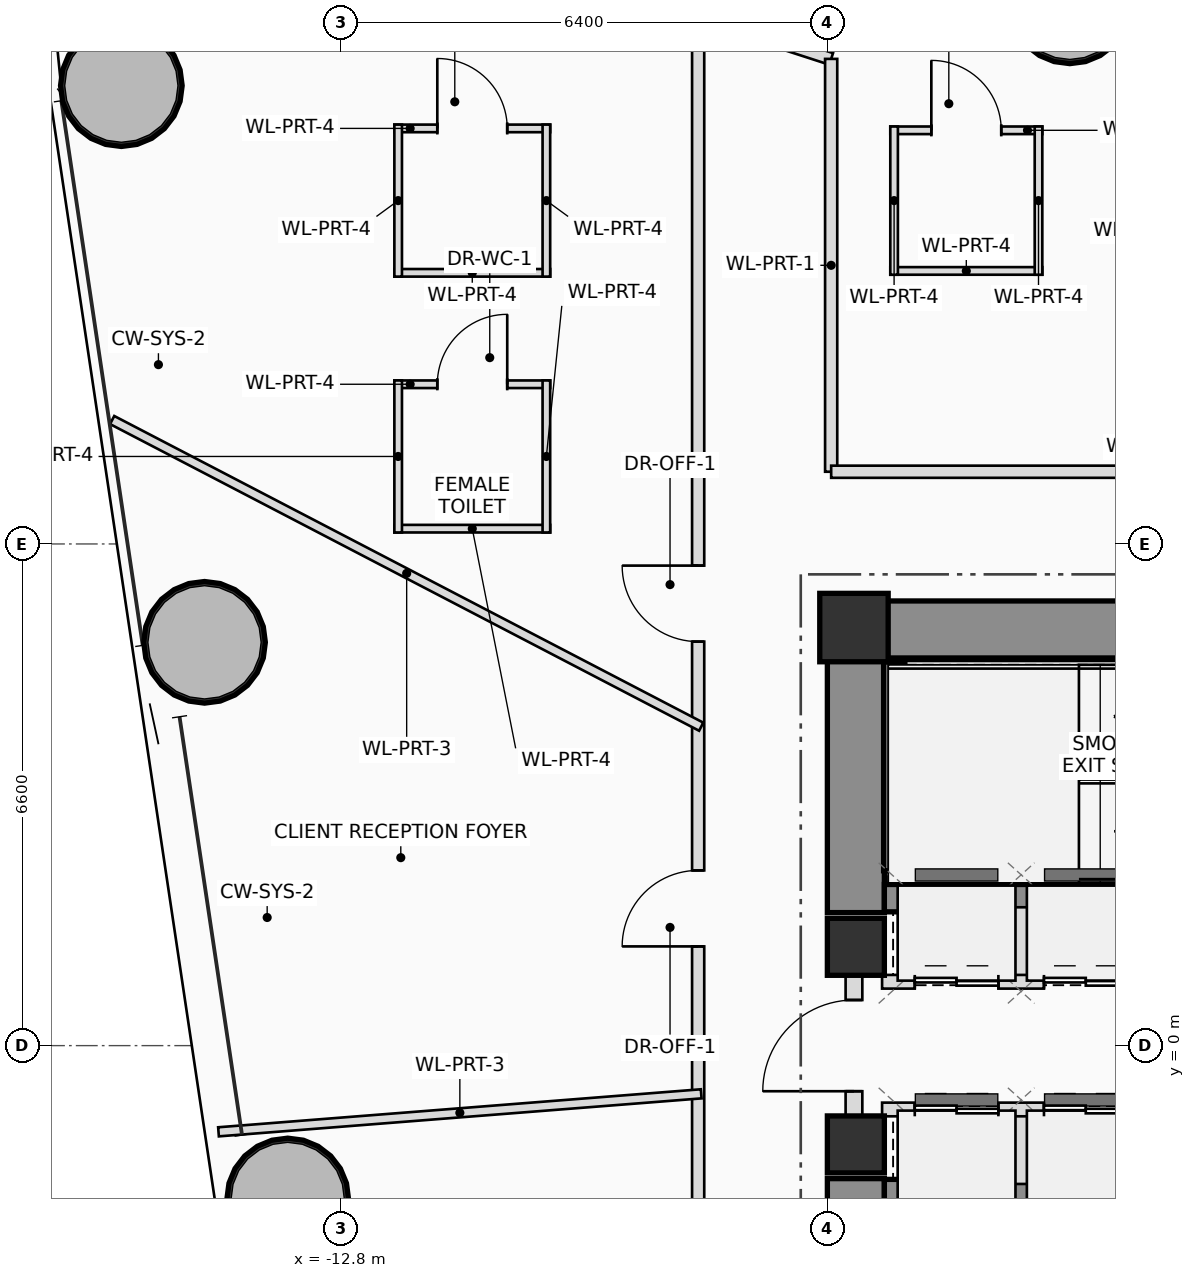
"""IFC4 building model, lengths in metres.
Left out: names, types, materials, properties, quantities, classifications, styles, units other than length and angle.
Written with IfcOpenShell. Run it as: python <this file> out.ifc"""

import sys

from ifc_helpers import new_model, si_unit, direction, frame, frame_2d, origin, origin_2d, place, context, subcontext, project, spatial, rectangle, hollow_circle, extrude, source, transform, mapped, element, fill, save


model = new_model("IFC4")
c1 = context("Model", 3, precision=1e-05, world=origin(), true_north=direction((0.0, 1.0)))
c2 = subcontext(c1, "Body", "Model", "MODEL_VIEW")
j1 = project(units=[si_unit("LENGTHUNIT", "METRE"), si_unit("PLANEANGLEUNIT", "RADIAN")], contexts=[c1])
p1 = place(None, origin())
s1 = spatial("IfcSite", under=j1, at=p1, CompositionType="ELEMENT")
p2 = place(p1, origin())
s2 = spatial("IfcBuilding", under=s1, at=p2, CompositionType="ELEMENT")
p3 = place(p2, frame((0.0, 0.0, 69.8)))
s3 = spatial("IfcBuildingStorey", under=s2, at=p3, CompositionType="ELEMENT", Elevation=69.8)
m1 = source(origin(), c2, "Body", "SweptSolid", [
    extrude(rectangle(XDim=0.9, YDim=0.9, at=origin_2d()), origin(), (0.0, 0.0, 1.0), 3.75),
])
p4 = place(p3, frame((-6.05, 5.5, 0.0), z_axis=(0.0, 0.0, 1.0), x_axis=(1.0, 0.0, 0.0)))
e1 = element("IfcColumn", 1, at=p4, inside=s3, PredefinedType="COLUMN", context=c2, shape_type="MappedRepresentation", body=[
    mapped(m1, transform((0.0, 0.0, 0.0), scale=1.0)),
])
p5 = place(p3, frame((-6.4, 5.475, 0.0), z_axis=(0.0, 0.0, 1.0), x_axis=(1.0, 0.0, 0.0)))
e2 = element("IfcWall", 2, at=p5, inside=s3, PredefinedType="SHEAR", context=c2, shape_type="SweptSolid", body=[
    extrude(rectangle(XDim=12.8, YDim=0.75, at=frame_2d((6.4, 0.0))), origin(), (0.0, 0.0, 1.0), 3.75),
])
p6 = place(p5, frame((8.6, 0.0, 0.0)))
e3 = element("IfcOpeningElement", 3, at=p6, cuts=e2, PredefinedType="OPENING", context=c2, shape_type="SweptSolid", body=[
    extrude(rectangle(XDim=1.2, YDim=2.2, at=frame_2d((0.6, 1.1))), frame((0.0, 0.385, 0.0), z_axis=(0.0, -1.0, 0.0), x_axis=(1.0, 0.0, 0.0)), (0.0, 0.0, 1.0), 0.77),
])
for number, where, z_axis, x_axis in (
    (4, (-6.025, -5.1, 0.0), (0.0, 0.0, 1.0), (0.0, 1.0, 0.0)),
    (5, (-6.025, 1.75, 0.0), (0.0, 0.0, 1.0), (0.0, 1.0, 0.0)),
):
    element("IfcWall", number, at=place(p3, frame(where, z_axis=z_axis, x_axis=x_axis)), inside=s3, PredefinedType="SHEAR", context=c2, shape_type="SweptSolid", body=[
        extrude(rectangle(XDim=3.35, YDim=0.75, at=frame_2d((1.675, 0.0))), origin(), (0.0, 0.0, 1.0), 3.75),
    ])
for number, where, z_axis, x_axis in (
    (6, (-5.65, 1.94, 0.0), (0.0, 0.0, 1.0), (1.0, 0.0, 0.0)),
    (7, (-5.65, -1.94, 0.0), (0.0, 0.0, 1.0), (1.0, 0.0, 0.0)),
):
    element("IfcWall", number, at=place(p3, frame(where, z_axis=z_axis, x_axis=x_axis)), inside=s3, PredefinedType="SHEAR", context=c2, shape_type="SweptSolid", body=[
        extrude(rectangle(XDim=11.3, YDim=0.36, at=frame_2d((5.65, 0.0))), origin(), (0.0, 0.0, 1.0), 3.75),
    ])
p7 = place(p3, frame((-5.52, 2.3, 0.0), z_axis=(0.0, 0.0, 1.0), x_axis=(0.0, 1.0, 0.0)))
e8 = element("IfcWall", 8, at=p7, inside=s3, PredefinedType="SHEAR", context=c2, shape_type="SweptSolid", body=[
    extrude(rectangle(XDim=2.75, YDim=0.28, at=frame_2d((1.375, 0.0))), origin(), (0.0, 0.0, 1.0), 3.75),
])
m2 = source(origin(), c2, "Body", "SweptSolid", [
    extrude(rectangle(XDim=0.75, YDim=0.75, at=origin_2d()), origin(), (0.0, 0.0, 1.0), 3.75),
])
for number, where, z_axis, x_axis in (
    (9, (-6.025, -1.3, 0.0), (0.0, 0.0, 1.0), (1.0, 0.0, 0.0)),
    (10, (-6.025, 1.3, 0.0), (0.0, 0.0, 1.0), (1.0, 0.0, 0.0)),
):
    element("IfcColumn", number, at=place(p3, frame(where, z_axis=z_axis, x_axis=x_axis)), inside=s3, PredefinedType="COLUMN", context=c2, shape_type="MappedRepresentation", body=[
        mapped(m2, transform((0.0, 0.0, 0.0), scale=1.0)),
    ])
m3 = source(origin(), c2, "Body", "SweptSolid", [
    extrude(hollow_circle(Radius=0.8, WallThickness=0.055, at=origin_2d()), origin(), (0.0, 0.0, 1.0), 3.75),
])
for number, where, z_axis, x_axis in (
    (11, (-3.21, 13.719, 0.0), (0.0, 0.0, 1.0), (1.0, 0.0, 0.0)),
    (12, (-15.689, 12.629, 0.0), (0.0, 0.0, 1.0), (1.0, 0.0, 0.0)),
    (13, (-14.594, 5.306, 0.0), (0.0, 0.0, 1.0), (1.0, 0.0, 0.0)),
    (14, (-13.5, -2.018, 0.0), (0.0, 0.0, 1.0), (1.0, 0.0, 0.0)),
):
    element("IfcColumn", number, at=place(p3, frame(where, z_axis=z_axis, x_axis=x_axis)), inside=s3, PredefinedType="COLUMN", context=c2, shape_type="MappedRepresentation", body=[
        mapped(m3, transform((0.0, 0.0, 0.0), scale=1.0)),
    ])
p8 = place(p3, frame((-6.05, -0.95, 0.0), z_axis=(0.0, 0.0, 1.0), x_axis=(0.0, 1.0, 0.0)))
e15 = element("IfcWall", 15, at=p8, inside=s3, PredefinedType="PLUMBINGWALL", context=c2, shape_type="SweptSolid", body=[
    extrude(rectangle(XDim=1.9, YDim=0.22, at=frame_2d((0.95, 0.0))), origin(), (0.0, 0.0, 1.0), 2.525),
])
p9 = place(p8, frame((0.35, 0.0, 0.0)))
e16 = element("IfcOpeningElement", 16, at=p9, cuts=e15, PredefinedType="OPENING", context=c2, shape_type="SweptSolid", body=[
    extrude(rectangle(XDim=1.2, YDim=2.2, at=frame_2d((0.6, 1.1))), frame((0.0, 0.12, 0.0), z_axis=(0.0, -1.0, 0.0), x_axis=(1.0, 0.0, 0.0)), (0.0, 0.0, 1.0), 0.24),
])
for number, where, z_axis, x_axis in (
    (17, (-3.85, 0.84, 0.0), (0.0, 0.0, 1.0), (0.0, 1.0, 0.0)),
    (18, (-3.85, -1.82, 0.0), (0.0, 0.0, 1.0), (0.0, 1.0, 0.0)),
):
    element("IfcWall", number, at=place(p3, frame(where, z_axis=z_axis, x_axis=x_axis)), inside=s3, PredefinedType="PLUMBINGWALL", context=c2, shape_type="SweptSolid", body=[
        extrude(rectangle(XDim=0.98, YDim=0.18, at=frame_2d((0.49, 0.0))), origin(), (0.0, 0.0, 1.0), 3.545),
    ])
p10 = place(p3, frame((-5.68, 0.84, 0.0), z_axis=(0.0, 0.0, 1.0), x_axis=(1.0, 0.0, 0.0)))
e19 = element("IfcWall", 19, at=p10, inside=s3, PredefinedType="PLUMBINGWALL", context=c2, shape_type="SweptSolid", body=[
    extrude(rectangle(XDim=11.33, YDim=0.18, at=frame_2d((5.665, 0.0))), origin(), (0.0, 0.0, 1.0), 3.545),
])
p11 = place(p10, frame((0.43, 0.0, 0.0)))
e20 = element("IfcOpeningElement", 20, at=p11, cuts=e19, PredefinedType="OPENING", context=c2, shape_type="SweptSolid", body=[
    extrude(rectangle(XDim=1.1, YDim=2.2, at=frame_2d((0.55, 1.1))), frame((0.0, 0.1, 0.0), z_axis=(0.0, -1.0, 0.0), x_axis=(1.0, 0.0, 0.0)), (0.0, 0.0, 1.0), 0.2),
])
p12 = place(p10, frame((2.13, 0.0, 0.0)))
e21 = element("IfcOpeningElement", 21, at=p12, cuts=e19, PredefinedType="OPENING", context=c2, shape_type="SweptSolid", body=[
    extrude(rectangle(XDim=1.1, YDim=2.2, at=frame_2d((0.55, 1.1))), frame((0.0, 0.1, 0.0), z_axis=(0.0, -1.0, 0.0), x_axis=(1.0, 0.0, 0.0)), (0.0, 0.0, 1.0), 0.2),
])
p13 = place(p3, frame((-5.68, -0.84, 0.0), z_axis=(0.0, 0.0, 1.0), x_axis=(1.0, 0.0, 0.0)))
e22 = element("IfcWall", 22, at=p13, inside=s3, PredefinedType="PLUMBINGWALL", context=c2, shape_type="SweptSolid", body=[
    extrude(rectangle(XDim=10.22, YDim=0.18, at=frame_2d((5.11, 0.0))), origin(), (0.0, 0.0, 1.0), 3.545),
])
p14 = place(p13, frame((0.43, 0.0, 0.0)))
e23 = element("IfcOpeningElement", 23, at=p14, cuts=e22, PredefinedType="OPENING", context=c2, shape_type="SweptSolid", body=[
    extrude(rectangle(XDim=1.1, YDim=2.2, at=frame_2d((0.55, 1.1))), frame((0.0, 0.1, 0.0), z_axis=(0.0, -1.0, 0.0), x_axis=(1.0, 0.0, 0.0)), (0.0, 0.0, 1.0), 0.2),
])
p15 = place(p13, frame((2.13, 0.0, 0.0)))
e24 = element("IfcOpeningElement", 24, at=p15, cuts=e22, PredefinedType="OPENING", context=c2, shape_type="SweptSolid", body=[
    extrude(rectangle(XDim=1.1, YDim=2.2, at=frame_2d((0.55, 1.1))), frame((0.0, 0.1, 0.0), z_axis=(0.0, -1.0, 0.0), x_axis=(1.0, 0.0, 0.0)), (0.0, 0.0, 1.0), 0.2),
])
p16 = place(p13, frame((9.02, 0.0, 0.0)))
e25 = element("IfcOpeningElement", 25, at=p16, cuts=e22, PredefinedType="OPENING", context=c2, shape_type="SweptSolid", body=[
    extrude(rectangle(XDim=0.9, YDim=2.05, at=frame_2d((0.45, 1.025))), frame((0.0, 0.1, 0.0), z_axis=(0.0, -1.0, 0.0), x_axis=(1.0, 0.0, 0.0)), (0.0, 0.0, 1.0), 0.2),
])
p17 = place(p3, frame((-12.097, 12.067, 0.0), z_axis=(0.0, 0.0, 1.0), x_axis=(1.0, 0.0, 0.0)))
e26 = element("IfcWall", 26, at=p17, inside=s3, PredefinedType="PARTITIONING", context=c2, shape_type="SweptSolid", body=[
    extrude(rectangle(XDim=2.05, YDim=0.1, at=frame_2d((1.025, 0.0))), origin(), (0.0, 0.0, 1.0), 3.2),
])
p18 = place(p17, frame((0.565, 0.0, 0.0)))
e27 = element("IfcOpeningElement", 27, at=p18, cuts=e26, PredefinedType="OPENING", context=c2, shape_type="SweptSolid", body=[
    extrude(rectangle(XDim=0.92, YDim=2.1, at=frame_2d((0.46, 1.05))), frame((0.0, 0.06, 0.0), z_axis=(0.0, -1.0, 0.0), x_axis=(1.0, 0.0, 0.0)), (0.0, 0.0, 1.0), 0.12),
])
p19 = place(p3, frame((-10.047, 10.167, 0.0), z_axis=(0.0, 0.0, 1.0), x_axis=(-1.0, 0.0, 0.0)))
e28 = element("IfcWall", 28, at=p19, inside=s3, PredefinedType="PARTITIONING", context=c2, shape_type="SweptSolid", body=[
    extrude(rectangle(XDim=2.05, YDim=0.1, at=frame_2d((1.025, 0.0))), origin(), (0.0, 0.0, 1.0), 3.545),
])
p20 = place(p3, frame((-10.097, 12.117, 0.0), z_axis=(0.0, 0.0, 1.0), x_axis=(0.0, -1.0, 0.0)))
e29 = element("IfcWall", 29, at=p20, inside=s3, PredefinedType="PARTITIONING", context=c2, shape_type="SweptSolid", body=[
    extrude(rectangle(XDim=2.0, YDim=0.1, at=frame_2d((1.0, 0.0))), origin(), (0.0, 0.0, 1.0), 3.545),
])
p21 = place(p3, frame((-12.047, 10.117, 0.0), z_axis=(0.0, 0.0, 1.0), x_axis=(0.0, 1.0, 0.0)))
e30 = element("IfcWall", 30, at=p21, inside=s3, PredefinedType="PARTITIONING", context=c2, shape_type="SweptSolid", body=[
    extrude(rectangle(XDim=2.0, YDim=0.1, at=frame_2d((1.0, 0.0))), origin(), (0.0, 0.0, 1.0), 3.2),
])
p22 = place(p3, frame((-12.097, 8.701, 0.0), z_axis=(0.0, 0.0, 1.0), x_axis=(1.0, 0.0, 0.0)))
e31 = element("IfcWall", 31, at=p22, inside=s3, PredefinedType="PARTITIONING", context=c2, shape_type="SweptSolid", body=[
    extrude(rectangle(XDim=2.05, YDim=0.1, at=frame_2d((1.025, 0.0))), origin(), (0.0, 0.0, 1.0), 2.85),
])
p23 = place(p22, frame((0.565, 0.0, 0.0)))
e32 = element("IfcOpeningElement", 32, at=p23, cuts=e31, PredefinedType="OPENING", context=c2, shape_type="SweptSolid", body=[
    extrude(rectangle(XDim=0.92, YDim=2.1, at=frame_2d((0.46, 1.05))), frame((0.0, 0.06, 0.0), z_axis=(0.0, -1.0, 0.0), x_axis=(1.0, 0.0, 0.0)), (0.0, 0.0, 1.0), 0.12),
])
p24 = place(p3, frame((-10.047, 6.801, 0.0), z_axis=(0.0, 0.0, 1.0), x_axis=(-1.0, 0.0, 0.0)))
e33 = element("IfcWall", 33, at=p24, inside=s3, PredefinedType="PARTITIONING", context=c2, shape_type="SweptSolid", body=[
    extrude(rectangle(XDim=2.05, YDim=0.1, at=frame_2d((1.025, 0.0))), origin(), (0.0, 0.0, 1.0), 3.05),
])
p25 = place(p3, frame((-10.097, 8.751, 0.0), z_axis=(0.0, 0.0, 1.0), x_axis=(0.0, -1.0, 0.0)))
e34 = element("IfcWall", 34, at=p25, inside=s3, PredefinedType="PARTITIONING", context=c2, shape_type="SweptSolid", body=[
    extrude(rectangle(XDim=2.0, YDim=0.1, at=frame_2d((1.0, 0.0))), origin(), (0.0, 0.0, 1.0), 2.85),
])
p26 = place(p3, frame((-12.047, 6.751, 0.0), z_axis=(0.0, 0.0, 1.0), x_axis=(0.0, 1.0, 0.0)))
e35 = element("IfcWall", 35, at=p26, inside=s3, PredefinedType="PARTITIONING", context=c2, shape_type="SweptSolid", body=[
    extrude(rectangle(XDim=2.0, YDim=0.1, at=frame_2d((1.0, 0.0))), origin(), (0.0, 0.0, 1.0), 3.545),
])
p27 = place(p3, frame((-5.572, 12.042, 0.0), z_axis=(0.0, 0.0, 1.0), x_axis=(1.0, 0.0, 0.0)))
e36 = element("IfcWall", 36, at=p27, inside=s3, PredefinedType="PARTITIONING", context=c2, shape_type="SweptSolid", body=[
    extrude(rectangle(XDim=2.0, YDim=0.1, at=frame_2d((1.0, 0.0))), origin(), (0.0, 0.0, 1.0), 2.85),
])
p28 = place(p27, frame((0.54, 0.0, 0.0)))
e37 = element("IfcOpeningElement", 37, at=p28, cuts=e36, PredefinedType="OPENING", context=c2, shape_type="SweptSolid", body=[
    extrude(rectangle(XDim=0.92, YDim=2.1, at=frame_2d((0.46, 1.05))), frame((0.0, 0.06, 0.0), z_axis=(0.0, -1.0, 0.0), x_axis=(1.0, 0.0, 0.0)), (0.0, 0.0, 1.0), 0.12),
])
p29 = place(p3, frame((-3.572, 10.192, 0.0), z_axis=(0.0, 0.0, 1.0), x_axis=(-1.0, 0.0, 0.0)))
e38 = element("IfcWall", 38, at=p29, inside=s3, PredefinedType="PARTITIONING", context=c2, shape_type="SweptSolid", body=[
    extrude(rectangle(XDim=2.0, YDim=0.1, at=frame_2d((1.0, 0.0))), origin(), (0.0, 0.0, 1.0), 2.85),
])
p30 = place(p3, frame((-3.622, 12.092, 0.0), z_axis=(0.0, 0.0, 1.0), x_axis=(0.0, -1.0, 0.0)))
e39 = element("IfcWall", 39, at=p30, inside=s3, PredefinedType="PARTITIONING", context=c2, shape_type="SweptSolid", body=[
    extrude(rectangle(XDim=1.95, YDim=0.1, at=frame_2d((0.975, 0.0))), origin(), (0.0, 0.0, 1.0), 2.85),
])
p31 = place(p3, frame((-5.522, 10.142, 0.0), z_axis=(0.0, 0.0, 1.0), x_axis=(0.0, 1.0, 0.0)))
e40 = element("IfcWall", 40, at=p31, inside=s3, PredefinedType="PARTITIONING", context=c2, shape_type="SweptSolid", body=[
    extrude(rectangle(XDim=1.95, YDim=0.1, at=frame_2d((0.975, 0.0))), origin(), (0.0, 0.0, 1.0), 3.2),
])
p32 = place(p3, frame((-8.1, -7.55, 0.0), z_axis=(0.0, 0.0, 1.0), x_axis=(0.0, 1.0, 0.0)))
e41 = element("IfcWall", 41, at=p32, inside=s3, PredefinedType="PARTITIONING", context=c2, shape_type="SweptSolid", body=[
    extrude(rectangle(XDim=15.1, YDim=0.16, at=frame_2d((7.55, 0.0))), origin(), (0.0, 0.0, 1.0), 2.85),
])
p33 = place(p32, frame((8.855, 0.0, 0.0)))
e42 = element("IfcOpeningElement", 42, at=p33, cuts=e41, PredefinedType="OPENING", context=c2, shape_type="SweptSolid", body=[
    extrude(rectangle(XDim=1.0, YDim=2.25, at=frame_2d((0.5, 1.125))), frame((0.0, 0.09, 0.0), z_axis=(0.0, -1.0, 0.0), x_axis=(1.0, 0.0, 0.0)), (0.0, 0.0, 1.0), 0.18),
])
p34 = place(p32, frame((12.865, 0.0, 0.0)))
e43 = element("IfcOpeningElement", 43, at=p34, cuts=e41, PredefinedType="OPENING", context=c2, shape_type="SweptSolid", body=[
    extrude(rectangle(XDim=1.0, YDim=2.25, at=frame_2d((0.5, 1.125))), frame((0.0, 0.09, 0.0), z_axis=(0.0, -1.0, 0.0), x_axis=(1.0, 0.0, 0.0)), (0.0, 0.0, 1.0), 0.18),
])
p35 = place(p3, frame((-8.1, 7.55, 0.0), z_axis=(0.0, 0.0, 1.0), x_axis=(0.0, 1.0, 0.0)))
e44 = element("IfcWall", 44, at=p35, inside=s3, PredefinedType="PARTITIONING", context=c2, shape_type="SweptSolid", body=[
    extrude(rectangle(XDim=5.85, YDim=0.16, at=frame_2d((2.925, 0.0))), origin(), (0.0, 0.0, 1.0), 2.85),
])
p36 = place(p3, frame((-7.641, 13.4, 0.0), z_axis=(0.0, 0.0, 1.0), x_axis=(0.951277022007, -0.308337521884, 0.0)))
e45 = element("IfcWall", 45, at=p36, inside=s3, PredefinedType="PARTITIONING", context=c2, shape_type="SweptSolid", body=[
    extrude(rectangle(XDim=1.357, YDim=0.16, at=frame_2d((0.679, 0.0))), origin(), (0.0, 0.0, 1.0), 3.545),
])
p37 = place(p3, frame((-6.35, 12.981, 0.0), z_axis=(0.0, 0.0, 1.0), x_axis=(0.0, -1.0, 0.0)))
e46 = element("IfcWall", 46, at=p37, inside=s3, PredefinedType="PARTITIONING", context=c2, shape_type="SweptSolid", body=[
    extrude(rectangle(XDim=5.431, YDim=0.16, at=frame_2d((2.716, 0.0))), origin(), (0.0, 0.0, 1.0), 3.05),
])
p38 = place(p3, frame((-6.35, 7.55, 0.0), z_axis=(0.0, 0.0, 1.0), x_axis=(1.0, 0.0, 0.0)))
e47 = element("IfcWall", 47, at=p38, inside=s3, PredefinedType="PARTITIONING", context=c2, shape_type="SweptSolid", body=[
    extrude(rectangle(XDim=12.7, YDim=0.16, at=frame_2d((6.35, 0.0))), origin(), (0.0, 0.0, 1.0), 2.85),
])
p39 = place(p38, frame((8.564, 0.0, 0.0)))
e48 = element("IfcOpeningElement", 48, at=p39, cuts=e47, PredefinedType="OPENING", context=c2, shape_type="SweptSolid", body=[
    extrude(rectangle(XDim=1.0, YDim=2.25, at=frame_2d((0.5, 1.125))), frame((0.0, 0.09, 0.0), z_axis=(0.0, -1.0, 0.0), x_axis=(1.0, 0.0, 0.0)), (0.0, 0.0, 1.0), 0.18),
])
p40 = place(p3, frame((-8.06, 4.196, 0.0), z_axis=(0.0, 0.0, 1.0), x_axis=(-0.887015422537, 0.461739797052, 0.0)))
e49 = element("IfcWall", 49, at=p40, inside=s3, PredefinedType="PARTITIONING", context=c2, shape_type="SweptSolid", body=[
    extrude(rectangle(XDim=8.738, YDim=0.12, at=frame_2d((4.369, 0.0))), origin(), (0.0, 0.0, 1.0), 2.85),
])
p41 = place(p3, frame((-8.06, -0.634, 0.0), z_axis=(0.0, 0.0, 1.0), x_axis=(-0.996917899667, -0.078451904529, 0.0)))
e50 = element("IfcWall", 50, at=p41, inside=s3, PredefinedType="PARTITIONING", context=c2, shape_type="SweptSolid", body=[
    extrude(rectangle(XDim=6.37, YDim=0.12, at=frame_2d((3.185, 0.0))), origin(), (0.0, 0.0, 1.0), 3.01),
])
p42 = place(p9, origin())
e51 = element("IfcDoor", 51, at=p42, inside=s3, OperationType="SINGLE_SWING_LEFT", PredefinedType="DOOR", context=c2, shape_type="SweptSolid", body=[
    extrude(rectangle(XDim=1.2, YDim=2.2, at=frame_2d((0.6, 1.1))), frame((0.0, 0.025, 0.0), z_axis=(0.0, -1.0, 0.0), x_axis=(1.0, 0.0, 0.0)), (0.0, 0.0, 1.0), 0.05),
])
fill(e16, e51)
p43 = place(p11, origin())
e52 = element("IfcDoor", 52, at=p43, inside=s3, OperationType="DOUBLE_DOOR_SLIDING", PredefinedType="DOOR", context=c2, shape_type="SweptSolid", body=[
    extrude(rectangle(XDim=1.1, YDim=2.2, at=frame_2d((0.55, 1.1))), frame((0.0, 0.025, 0.0), z_axis=(0.0, -1.0, 0.0), x_axis=(1.0, 0.0, 0.0)), (0.0, 0.0, 1.0), 0.05),
])
fill(e20, e52)
p44 = place(p12, origin())
e53 = element("IfcDoor", 53, at=p44, inside=s3, OperationType="DOUBLE_DOOR_SLIDING", PredefinedType="DOOR", context=c2, shape_type="SweptSolid", body=[
    extrude(rectangle(XDim=1.1, YDim=2.2, at=frame_2d((0.55, 1.1))), frame((0.0, 0.025, 0.0), z_axis=(0.0, -1.0, 0.0), x_axis=(1.0, 0.0, 0.0)), (0.0, 0.0, 1.0), 0.05),
])
fill(e21, e53)
p45 = place(p14, origin())
e54 = element("IfcDoor", 54, at=p45, inside=s3, OperationType="DOUBLE_DOOR_SLIDING", PredefinedType="DOOR", context=c2, shape_type="SweptSolid", body=[
    extrude(rectangle(XDim=1.1, YDim=2.2, at=frame_2d((0.55, 1.1))), frame((0.0, 0.025, 0.0), z_axis=(0.0, -1.0, 0.0), x_axis=(1.0, 0.0, 0.0)), (0.0, 0.0, 1.0), 0.05),
])
fill(e23, e54)
p46 = place(p15, origin())
e55 = element("IfcDoor", 55, at=p46, inside=s3, OperationType="DOUBLE_DOOR_SLIDING", PredefinedType="DOOR", context=c2, shape_type="SweptSolid", body=[
    extrude(rectangle(XDim=1.1, YDim=2.2, at=frame_2d((0.55, 1.1))), frame((0.0, 0.025, 0.0), z_axis=(0.0, -1.0, 0.0), x_axis=(1.0, 0.0, 0.0)), (0.0, 0.0, 1.0), 0.05),
])
fill(e24, e55)
p47 = place(p18, origin())
e56 = element("IfcDoor", 56, at=p47, inside=s3, OperationType="SINGLE_SWING_LEFT", PredefinedType="DOOR", context=c2, shape_type="SweptSolid", body=[
    extrude(rectangle(XDim=0.92, YDim=2.1, at=frame_2d((0.46, 1.05))), frame((0.0, 0.025, 0.0), z_axis=(0.0, -1.0, 0.0), x_axis=(1.0, 0.0, 0.0)), (0.0, 0.0, 1.0), 0.05),
])
fill(e27, e56)
p48 = place(p23, origin())
e57 = element("IfcDoor", 57, at=p48, inside=s3, OperationType="SINGLE_SWING_RIGHT", PredefinedType="DOOR", context=c2, shape_type="SweptSolid", body=[
    extrude(rectangle(XDim=0.92, YDim=2.1, at=frame_2d((0.46, 1.05))), frame((0.0, 0.025, 0.0), z_axis=(0.0, -1.0, 0.0), x_axis=(1.0, 0.0, 0.0)), (0.0, 0.0, 1.0), 0.05),
])
fill(e32, e57)
p49 = place(p28, origin())
e58 = element("IfcDoor", 58, at=p49, inside=s3, OperationType="SINGLE_SWING_LEFT", PredefinedType="DOOR", context=c2, shape_type="SweptSolid", body=[
    extrude(rectangle(XDim=0.92, YDim=2.1, at=frame_2d((0.46, 1.05))), frame((0.0, 0.025, 0.0), z_axis=(0.0, -1.0, 0.0), x_axis=(1.0, 0.0, 0.0)), (0.0, 0.0, 1.0), 0.05),
])
fill(e37, e58)
p50 = place(p33, origin())
e59 = element("IfcDoor", 59, at=p50, inside=s3, OperationType="SINGLE_SWING_LEFT", PredefinedType="DOOR", context=c2, shape_type="SweptSolid", body=[
    extrude(rectangle(XDim=1.0, YDim=2.25, at=frame_2d((0.5, 1.125))), frame((0.0, 0.025, 0.0), z_axis=(0.0, -1.0, 0.0), x_axis=(1.0, 0.0, 0.0)), (0.0, 0.0, 1.0), 0.05),
])
fill(e42, e59)
p51 = place(p34, origin())
e60 = element("IfcDoor", 60, at=p51, inside=s3, OperationType="SINGLE_SWING_RIGHT", PredefinedType="DOOR", context=c2, shape_type="SweptSolid", body=[
    extrude(rectangle(XDim=1.0, YDim=2.25, at=frame_2d((0.5, 1.125))), frame((0.0, 0.025, 0.0), z_axis=(0.0, -1.0, 0.0), x_axis=(1.0, 0.0, 0.0)), (0.0, 0.0, 1.0), 0.05),
])
fill(e43, e60)
save(model, sys.argv[1])
